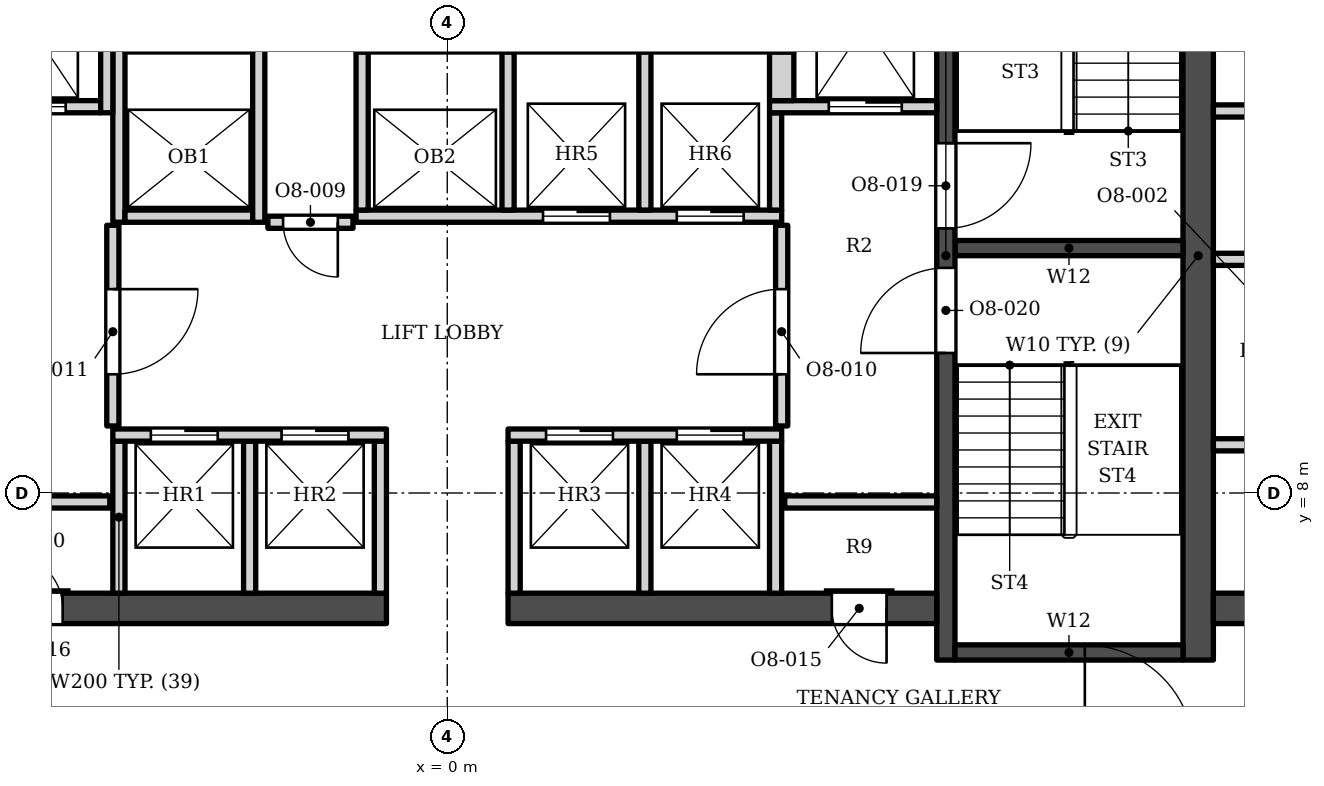
"""IFC4 building model, lengths in metres.
Left out: names, types, materials, properties, quantities, classifications, styles, units other than length and angle.
Written with IfcOpenShell. Run it as: python <this file> out.ifc"""

import sys

from ifc_helpers import new_model, si_unit, direction, frame, frame_2d, origin, place, context, subcontext, project, spatial, rectangle, extrude, element, fill, save


model = new_model("IFC4")
c1 = context("Model", 3, precision=1e-05, world=origin(), true_north=direction((0.0, 1.0)))
c2 = subcontext(c1, "Body", "Model", "MODEL_VIEW")
j1 = project(units=[si_unit("LENGTHUNIT", "METRE"), si_unit("PLANEANGLEUNIT", "RADIAN")], contexts=[c1])
p1 = place(None, origin())
s1 = spatial("IfcSite", under=j1, at=p1, CompositionType="ELEMENT")
p2 = place(p1, origin())
s2 = spatial("IfcBuilding", under=s1, at=p2, CompositionType="ELEMENT")
p3 = place(p2, frame((0.0, 0.0, 231.5)))
s3 = spatial("IfcBuildingStorey", under=s2, at=p3, CompositionType="ELEMENT", Elevation=231.5)
p4 = place(p3, frame((12.35, 5.253, 0.0), z_axis=(0.0, 0.0, 1.0), x_axis=(0.0, 1.0, 0.0)))
e1 = element("IfcWall", 1, at=p4, inside=s3, PredefinedType="SHEAR", context=c2, shape_type="SweptSolid", body=[
    extrude(rectangle(XDim=13.3, YDim=0.5, at=frame_2d((6.65, 0.0))), origin(), (0.0, 0.0, 1.0), 3.9),
])
p5 = place(p3, frame((8.2, 5.253, 0.0), z_axis=(0.0, 0.0, 1.0), x_axis=(0.0, 1.0, 0.0)))
e2 = element("IfcWall", 2, at=p5, inside=s3, PredefinedType="SHEAR", context=c2, shape_type="SweptSolid", body=[
    extrude(rectangle(XDim=13.3, YDim=0.3, at=frame_2d((6.65, 0.0))), origin(), (0.0, 0.0, 1.0), 3.9),
])
p6 = place(p5, frame((7.1, 0.0, 0.0)))
e3 = element("IfcOpeningElement", 3, at=p6, cuts=e2, PredefinedType="OPENING", context=c2, shape_type="SweptSolid", body=[
    extrude(rectangle(XDim=1.4, YDim=2.1, at=frame_2d((0.7, 1.05))), frame((0.0, 0.16, 0.0), z_axis=(0.0, -1.0, 0.0), x_axis=(1.0, 0.0, 0.0)), (0.0, 0.0, 1.0), 0.32),
])
p7 = place(p5, frame((5.05, 0.0, 0.0)))
e4 = element("IfcOpeningElement", 4, at=p7, cuts=e2, PredefinedType="OPENING", context=c2, shape_type="SweptSolid", body=[
    extrude(rectangle(XDim=1.4, YDim=2.1, at=frame_2d((0.7, 1.05))), frame((0.0, 0.16, 0.0), z_axis=(0.0, -1.0, 0.0), x_axis=(1.0, 0.0, 0.0)), (0.0, 0.0, 1.0), 0.32),
])
for number, where, z_axis, x_axis in (
    (5, (8.35, 12.028, 0.0), (0.0, 0.0, 1.0), (1.0, 0.0, 0.0)),
    (6, (8.35, 5.378, 0.0), (0.0, 0.0, 1.0), (1.0, 0.0, 0.0)),
):
    element("IfcWall", number, at=place(p3, frame(where, z_axis=z_axis, x_axis=x_axis)), inside=s3, PredefinedType="SHEAR", context=c2, shape_type="SweptSolid", body=[
        extrude(rectangle(XDim=3.75, YDim=0.25, at=frame_2d((1.875, 0.0))), origin(), (0.0, 0.0, 1.0), 3.9),
    ])
p8 = place(p3, frame((-8.05, 6.103, 0.0), z_axis=(0.0, 0.0, 1.0), x_axis=(1.0, 0.0, 0.0)))
e7 = element("IfcWall", 7, at=p8, inside=s3, PredefinedType="SHEAR", context=c2, shape_type="SweptSolid", body=[
    extrude(rectangle(XDim=7.05, YDim=0.5, at=frame_2d((3.525, 0.0))), origin(), (0.0, 0.0, 1.0), 3.9),
])
p9 = place(p8, frame((0.825, 0.0, 0.0)))
e8 = element("IfcOpeningElement", 8, at=p9, cuts=e7, PredefinedType="OPENING", context=c2, shape_type="SweptSolid", body=[
    extrude(rectangle(XDim=0.9, YDim=2.1, at=frame_2d((0.45, 1.05))), frame((0.0, 0.26, 0.0), z_axis=(0.0, -1.0, 0.0), x_axis=(1.0, 0.0, 0.0)), (0.0, 0.0, 1.0), 0.52),
])
p10 = place(p3, frame((1.0, 6.103, 0.0), z_axis=(0.0, 0.0, 1.0), x_axis=(1.0, 0.0, 0.0)))
e9 = element("IfcWall", 9, at=p10, inside=s3, PredefinedType="SHEAR", context=c2, shape_type="SweptSolid", body=[
    extrude(rectangle(XDim=7.05, YDim=0.5, at=frame_2d((3.525, 0.0))), origin(), (0.0, 0.0, 1.0), 3.9),
])
p11 = place(p10, frame((5.325, 0.0, 0.0)))
e10 = element("IfcOpeningElement", 10, at=p11, cuts=e9, PredefinedType="OPENING", context=c2, shape_type="SweptSolid", body=[
    extrude(rectangle(XDim=0.9, YDim=2.1, at=frame_2d((0.45, 1.05))), frame((0.0, 0.26, 0.0), z_axis=(0.0, -1.0, 0.0), x_axis=(1.0, 0.0, 0.0)), (0.0, 0.0, 1.0), 0.52),
])
p12 = place(p3, frame((12.6, 6.103, 0.0), z_axis=(0.0, 0.0, 1.0), x_axis=(1.0, 0.0, 0.0)))
e11 = element("IfcWall", 11, at=p12, inside=s3, PredefinedType="SHEAR", context=c2, shape_type="SweptSolid", body=[
    extrude(rectangle(XDim=1.3, YDim=0.5, at=frame_2d((0.65, 0.0))), origin(), (0.0, 0.0, 1.0), 3.9),
])
for number, where, z_axis, x_axis in (
    (12, (-5.4, 6.353, 0.0), (0.0, 0.0, 1.0), (0.0, 1.0, 0.0)),
    (13, (-3.25, 6.353, 0.0), (0.0, 0.0, 1.0), (0.0, 1.0, 0.0)),
    (14, (-1.1, 6.353, 0.0), (0.0, 0.0, 1.0), (0.0, 1.0, 0.0)),
    (15, (1.1, 6.353, 0.0), (0.0, 0.0, 1.0), (0.0, 1.0, 0.0)),
    (16, (3.25, 6.353, 0.0), (0.0, 0.0, 1.0), (0.0, 1.0, 0.0)),
    (17, (5.4, 6.353, 0.0), (0.0, 0.0, 1.0), (0.0, 1.0, 0.0)),
    (18, (-8.05, 7.853, 0.0), (0.0, 0.0, 1.0), (1.0, 0.0, 0.0)),
    (19, (5.55, 7.853, 0.0), (0.0, 0.0, 1.0), (1.0, 0.0, 0.0)),
):
    element("IfcWall", number, at=place(p3, frame(where, z_axis=z_axis, x_axis=x_axis)), inside=s3, PredefinedType="SOLIDWALL", context=c2, shape_type="SweptSolid", body=[
        extrude(rectangle(XDim=2.5, YDim=0.2, at=frame_2d((1.25, 0.0))), origin(), (0.0, 0.0, 1.0), 3.73),
    ])
p13 = place(p3, frame((12.6, 8.792, 0.0), z_axis=(0.0, 0.0, 1.0), x_axis=(1.0, 0.0, 0.0)))
e20 = element("IfcWall", 20, at=p13, inside=s3, PredefinedType="SOLIDWALL", context=c2, shape_type="SweptSolid", body=[
    extrude(rectangle(XDim=1.3, YDim=0.2, at=frame_2d((0.65, 0.0))), origin(), (0.0, 0.0, 1.0), 3.73),
])
p14 = place(p3, frame((-5.5, 8.953, 0.0), z_axis=(0.0, 0.0, 1.0), x_axis=(1.0, 0.0, 0.0)))
e21 = element("IfcWall", 21, at=p14, inside=s3, PredefinedType="SOLIDWALL", context=c2, shape_type="SweptSolid", body=[
    extrude(rectangle(XDim=4.5, YDim=0.2, at=frame_2d((2.25, 0.0))), origin(), (0.0, 0.0, 1.0), 3.73),
])
p15 = place(p14, frame((0.625, 0.0, 0.0)))
e22 = element("IfcOpeningElement", 22, at=p15, cuts=e21, PredefinedType="OPENING", context=c2, shape_type="SweptSolid", body=[
    extrude(rectangle(XDim=1.1, YDim=2.1, at=frame_2d((0.55, 1.05))), frame((0.0, 0.11, 0.0), z_axis=(0.0, -1.0, 0.0), x_axis=(1.0, 0.0, 0.0)), (0.0, 0.0, 1.0), 0.22),
])
p16 = place(p14, frame((2.775, 0.0, 0.0)))
e23 = element("IfcOpeningElement", 23, at=p16, cuts=e21, PredefinedType="OPENING", context=c2, shape_type="SweptSolid", body=[
    extrude(rectangle(XDim=1.1, YDim=2.1, at=frame_2d((0.55, 1.05))), frame((0.0, 0.11, 0.0), z_axis=(0.0, -1.0, 0.0), x_axis=(1.0, 0.0, 0.0)), (0.0, 0.0, 1.0), 0.22),
])
p17 = place(p3, frame((1.0, 8.953, 0.0), z_axis=(0.0, 0.0, 1.0), x_axis=(1.0, 0.0, 0.0)))
e24 = element("IfcWall", 24, at=p17, inside=s3, PredefinedType="SOLIDWALL", context=c2, shape_type="SweptSolid", body=[
    extrude(rectangle(XDim=4.5, YDim=0.2, at=frame_2d((2.25, 0.0))), origin(), (0.0, 0.0, 1.0), 3.73),
])
p18 = place(p17, frame((0.625, 0.0, 0.0)))
e25 = element("IfcOpeningElement", 25, at=p18, cuts=e24, PredefinedType="OPENING", context=c2, shape_type="SweptSolid", body=[
    extrude(rectangle(XDim=1.1, YDim=2.1, at=frame_2d((0.55, 1.05))), frame((0.0, 0.11, 0.0), z_axis=(0.0, -1.0, 0.0), x_axis=(1.0, 0.0, 0.0)), (0.0, 0.0, 1.0), 0.22),
])
p19 = place(p17, frame((2.775, 0.0, 0.0)))
e26 = element("IfcOpeningElement", 26, at=p19, cuts=e24, PredefinedType="OPENING", context=c2, shape_type="SweptSolid", body=[
    extrude(rectangle(XDim=1.1, YDim=2.1, at=frame_2d((0.55, 1.05))), frame((0.0, 0.11, 0.0), z_axis=(0.0, -1.0, 0.0), x_axis=(1.0, 0.0, 0.0)), (0.0, 0.0, 1.0), 0.22),
])
p20 = place(p3, frame((-5.5, 9.103, 0.0), z_axis=(0.0, 0.0, 1.0), x_axis=(0.0, 1.0, 0.0)))
e27 = element("IfcWall", 27, at=p20, inside=s3, PredefinedType="SOLIDWALL", context=c2, shape_type="SweptSolid", body=[
    extrude(rectangle(XDim=3.3, YDim=0.2, at=frame_2d((1.65, 0.0))), origin(), (0.0, 0.0, 1.0), 3.73),
])
p21 = place(p20, frame((0.85, 0.0, 0.0)))
e28 = element("IfcOpeningElement", 28, at=p21, cuts=e27, PredefinedType="OPENING", context=c2, shape_type="SweptSolid", body=[
    extrude(rectangle(XDim=1.4, YDim=2.1, at=frame_2d((0.7, 1.05))), frame((0.0, 0.11, 0.0), z_axis=(0.0, -1.0, 0.0), x_axis=(1.0, 0.0, 0.0)), (0.0, 0.0, 1.0), 0.22),
])
p22 = place(p3, frame((5.5, 9.103, 0.0), z_axis=(0.0, 0.0, 1.0), x_axis=(0.0, 1.0, 0.0)))
e29 = element("IfcWall", 29, at=p22, inside=s3, PredefinedType="SOLIDWALL", context=c2, shape_type="SweptSolid", body=[
    extrude(rectangle(XDim=3.3, YDim=0.2, at=frame_2d((1.65, 0.0))), origin(), (0.0, 0.0, 1.0), 3.73),
])
p23 = place(p22, frame((0.85, 0.0, 0.0)))
e30 = element("IfcOpeningElement", 30, at=p23, cuts=e29, PredefinedType="OPENING", context=c2, shape_type="SweptSolid", body=[
    extrude(rectangle(XDim=1.4, YDim=2.1, at=frame_2d((0.7, 1.05))), frame((0.0, 0.11, 0.0), z_axis=(0.0, -1.0, 0.0), x_axis=(1.0, 0.0, 0.0)), (0.0, 0.0, 1.0), 0.22),
])
p24 = place(p3, frame((12.6, 11.843, 0.0), z_axis=(0.0, 0.0, 1.0), x_axis=(1.0, 0.0, 0.0)))
e31 = element("IfcWall", 31, at=p24, inside=s3, PredefinedType="SOLIDWALL", context=c2, shape_type="SweptSolid", body=[
    extrude(rectangle(XDim=1.3, YDim=0.2, at=frame_2d((0.65, 0.0))), origin(), (0.0, 0.0, 1.0), 3.73),
])
p25 = place(p3, frame((-2.95, 12.453, 0.0), z_axis=(0.0, 0.0, 1.0), x_axis=(1.0, 0.0, 0.0)))
e32 = element("IfcWall", 32, at=p25, inside=s3, PredefinedType="SOLIDWALL", context=c2, shape_type="SweptSolid", body=[
    extrude(rectangle(XDim=1.4, YDim=0.2, at=frame_2d((0.7, 0.0))), origin(), (0.0, 0.0, 1.0), 3.73),
])
p26 = place(p25, frame((0.25, 0.0, 0.0)))
e33 = element("IfcOpeningElement", 33, at=p26, cuts=e32, PredefinedType="OPENING", context=c2, shape_type="SweptSolid", body=[
    extrude(rectangle(XDim=0.9, YDim=2.1, at=frame_2d((0.45, 1.05))), frame((0.0, 0.11, 0.0), z_axis=(0.0, -1.0, 0.0), x_axis=(1.0, 0.0, 0.0)), (0.0, 0.0, 1.0), 0.22),
])
p27 = place(p3, frame((-5.4, 12.453, 0.0), z_axis=(0.0, 0.0, 1.0), x_axis=(0.0, 1.0, 0.0)))
e34 = element("IfcWall", 34, at=p27, inside=s3, PredefinedType="SOLIDWALL", context=c2, shape_type="SweptSolid", body=[
    extrude(rectangle(XDim=3.0, YDim=0.2, at=frame_2d((1.5, 0.0))), origin(), (0.0, 0.0, 1.0), 3.73),
])
p28 = place(p3, frame((-5.3, 12.552, 0.0), z_axis=(0.0, 0.0, 1.0), x_axis=(1.0, 0.0, 0.0)))
e35 = element("IfcWall", 35, at=p28, inside=s3, PredefinedType="SOLIDWALL", context=c2, shape_type="SweptSolid", body=[
    extrude(rectangle(XDim=2.1, YDim=0.2, at=frame_2d((1.05, 0.0))), origin(), (0.0, 0.0, 1.0), 3.73),
])
p29 = place(p3, frame((-3.1, 12.453, 0.0), z_axis=(0.0, 0.0, 1.0), x_axis=(0.0, 1.0, 0.0)))
e36 = element("IfcWall", 36, at=p29, inside=s3, PredefinedType="SOLIDWALL", context=c2, shape_type="SweptSolid", body=[
    extrude(rectangle(XDim=3.0, YDim=0.2, at=frame_2d((1.5, 0.0))), origin(), (0.0, 0.0, 1.0), 3.73),
])
p30 = place(p3, frame((-1.5, 12.552, 0.0), z_axis=(0.0, 0.0, 1.0), x_axis=(1.0, 0.0, 0.0)))
e37 = element("IfcWall", 37, at=p30, inside=s3, PredefinedType="SOLIDWALL", context=c2, shape_type="SweptSolid", body=[
    extrude(rectangle(XDim=7.0, YDim=0.2, at=frame_2d((3.5, 0.0))), origin(), (0.0, 0.0, 1.0), 3.73),
])
p31 = place(p30, frame((3.075, 0.0, 0.0)))
e38 = element("IfcOpeningElement", 38, at=p31, cuts=e37, PredefinedType="OPENING", context=c2, shape_type="SweptSolid", body=[
    extrude(rectangle(XDim=1.1, YDim=2.1, at=frame_2d((0.55, 1.05))), frame((0.0, 0.11, 0.0), z_axis=(0.0, -1.0, 0.0), x_axis=(1.0, 0.0, 0.0)), (0.0, 0.0, 1.0), 0.22),
])
p32 = place(p30, frame((5.275, 0.0, 0.0)))
e39 = element("IfcOpeningElement", 39, at=p32, cuts=e37, PredefinedType="OPENING", context=c2, shape_type="SweptSolid", body=[
    extrude(rectangle(XDim=1.1, YDim=2.1, at=frame_2d((0.55, 1.05))), frame((0.0, 0.11, 0.0), z_axis=(0.0, -1.0, 0.0), x_axis=(1.0, 0.0, 0.0)), (0.0, 0.0, 1.0), 0.22),
])
for number, where, z_axis, x_axis in (
    (40, (-1.4, 12.653, 0.0), (0.0, 0.0, 1.0), (0.0, 1.0, 0.0)),
    (41, (1.0, 12.653, 0.0), (0.0, 0.0, 1.0), (0.0, 1.0, 0.0)),
    (42, (3.25, 12.653, 0.0), (0.0, 0.0, 1.0), (0.0, 1.0, 0.0)),
):
    element("IfcWall", number, at=place(p3, frame(where, z_axis=z_axis, x_axis=x_axis)), inside=s3, PredefinedType="SOLIDWALL", context=c2, shape_type="SweptSolid", body=[
        extrude(rectangle(XDim=2.6, YDim=0.2, at=frame_2d((1.3, 0.0))), origin(), (0.0, 0.0, 1.0), 3.73),
    ])
p33 = place(p3, frame((5.4, 12.653, 0.0), z_axis=(0.0, 0.0, 1.0), x_axis=(0.0, 1.0, 0.0)))
e43 = element("IfcWall", 43, at=p33, inside=s3, PredefinedType="SOLIDWALL", context=c2, shape_type="SweptSolid", body=[
    extrude(rectangle(XDim=1.6, YDim=0.2, at=frame_2d((0.8, 0.0))), origin(), (0.0, 0.0, 1.0), 3.73),
])
p34 = place(p3, frame((12.6, 14.283, 0.0), z_axis=(0.0, 0.0, 1.0), x_axis=(1.0, 0.0, 0.0)))
e44 = element("IfcWall", 44, at=p34, inside=s3, PredefinedType="SOLIDWALL", context=c2, shape_type="SweptSolid", body=[
    extrude(rectangle(XDim=1.3, YDim=0.2, at=frame_2d((0.65, 0.0))), origin(), (0.0, 0.0, 1.0), 3.73),
])
p35 = place(p3, frame((-8.05, 14.353, 0.0), z_axis=(0.0, 0.0, 1.0), x_axis=(1.0, 0.0, 0.0)))
e45 = element("IfcWall", 45, at=p35, inside=s3, PredefinedType="SOLIDWALL", context=c2, shape_type="SweptSolid", body=[
    extrude(rectangle(XDim=2.35, YDim=0.2, at=frame_2d((1.175, 0.0))), origin(), (0.0, 0.0, 1.0), 3.73),
])
p36 = place(p35, frame((0.575, 0.0, 0.0)))
e46 = element("IfcOpeningElement", 46, at=p36, cuts=e45, PredefinedType="OPENING", context=c2, shape_type="SweptSolid", body=[
    extrude(rectangle(XDim=1.2, YDim=2.1, at=frame_2d((0.6, 1.05))), frame((0.0, 0.11, 0.0), z_axis=(0.0, -1.0, 0.0), x_axis=(1.0, 0.0, 0.0)), (0.0, 0.0, 1.0), 0.22),
])
p37 = place(p3, frame((-5.6, 14.253, 0.0), z_axis=(0.0, 0.0, 1.0), x_axis=(0.0, 1.0, 0.0)))
e47 = element("IfcWall", 47, at=p37, inside=s3, PredefinedType="SOLIDWALL", context=c2, shape_type="SweptSolid", body=[
    extrude(rectangle(XDim=4.3, YDim=0.2, at=frame_2d((2.15, 0.0))), origin(), (0.0, 0.0, 1.0), 3.73),
])
p38 = place(p3, frame((5.3, 14.353, 0.0), z_axis=(0.0, 0.0, 1.0), x_axis=(1.0, 0.0, 0.0)))
e48 = element("IfcWall", 48, at=p38, inside=s3, PredefinedType="SOLIDWALL", context=c2, shape_type="SweptSolid", body=[
    extrude(rectangle(XDim=2.75, YDim=0.2, at=frame_2d((1.375, 0.0))), origin(), (0.0, 0.0, 1.0), 3.73),
])
p39 = place(p38, frame((0.975, 0.0, 0.0)))
e49 = element("IfcOpeningElement", 49, at=p39, cuts=e48, PredefinedType="OPENING", context=c2, shape_type="SweptSolid", body=[
    extrude(rectangle(XDim=1.2, YDim=2.1, at=frame_2d((0.6, 1.05))), frame((0.0, 0.11, 0.0), z_axis=(0.0, -1.0, 0.0), x_axis=(1.0, 0.0, 0.0)), (0.0, 0.0, 1.0), 0.22),
])
p40 = place(p3, frame((5.5, 14.453, 0.0), z_axis=(0.0, 0.0, 1.0), x_axis=(0.0, 1.0, 0.0)))
e50 = element("IfcWall", 50, at=p40, inside=s3, PredefinedType="SOLIDWALL", context=c2, shape_type="SweptSolid", body=[
    extrude(rectangle(XDim=0.8, YDim=0.4, at=frame_2d((0.4, 0.0))), origin(), (0.0, 0.0, 1.0), 3.73),
])
p41 = place(p3, frame((-5.3, 15.353, 0.0), z_axis=(0.0, 0.0, 1.0), x_axis=(1.0, 0.0, 0.0)))
e51 = element("IfcWall", 51, at=p41, inside=s3, PredefinedType="SOLIDWALL", context=c2, shape_type="SweptSolid", body=[
    extrude(rectangle(XDim=2.1, YDim=0.2, at=frame_2d((1.05, 0.0))), origin(), (0.0, 0.0, 1.0), 3.73),
])
p42 = place(p3, frame((-1.5, 15.353, 0.0), z_axis=(0.0, 0.0, 1.0), x_axis=(1.0, 0.0, 0.0)))
e52 = element("IfcWall", 52, at=p42, inside=s3, PredefinedType="SOLIDWALL", context=c2, shape_type="SweptSolid", body=[
    extrude(rectangle(XDim=7.2, YDim=0.2, at=frame_2d((3.6, 0.0))), origin(), (0.0, 0.0, 1.0), 3.73),
])
p43 = place(p15, origin())
e53 = element("IfcDoor", 53, at=p43, inside=s3, OperationType="DOUBLE_DOOR_SLIDING", PredefinedType="DOOR", context=c2, shape_type="SweptSolid", body=[
    extrude(rectangle(XDim=1.1, YDim=2.1, at=frame_2d((0.55, 1.05))), frame((0.0, 0.025, 0.0), z_axis=(0.0, -1.0, 0.0), x_axis=(1.0, 0.0, 0.0)), (0.0, 0.0, 1.0), 0.05),
])
fill(e22, e53)
p44 = place(p16, origin())
e54 = element("IfcDoor", 54, at=p44, inside=s3, OperationType="DOUBLE_DOOR_SLIDING", PredefinedType="DOOR", context=c2, shape_type="SweptSolid", body=[
    extrude(rectangle(XDim=1.1, YDim=2.1, at=frame_2d((0.55, 1.05))), frame((0.0, 0.025, 0.0), z_axis=(0.0, -1.0, 0.0), x_axis=(1.0, 0.0, 0.0)), (0.0, 0.0, 1.0), 0.05),
])
fill(e23, e54)
p45 = place(p18, origin())
e55 = element("IfcDoor", 55, at=p45, inside=s3, OperationType="DOUBLE_DOOR_SLIDING", PredefinedType="DOOR", context=c2, shape_type="SweptSolid", body=[
    extrude(rectangle(XDim=1.1, YDim=2.1, at=frame_2d((0.55, 1.05))), frame((0.0, 0.025, 0.0), z_axis=(0.0, -1.0, 0.0), x_axis=(1.0, 0.0, 0.0)), (0.0, 0.0, 1.0), 0.05),
])
fill(e25, e55)
p46 = place(p19, origin())
e56 = element("IfcDoor", 56, at=p46, inside=s3, OperationType="DOUBLE_DOOR_SLIDING", PredefinedType="DOOR", context=c2, shape_type="SweptSolid", body=[
    extrude(rectangle(XDim=1.1, YDim=2.1, at=frame_2d((0.55, 1.05))), frame((0.0, 0.025, 0.0), z_axis=(0.0, -1.0, 0.0), x_axis=(1.0, 0.0, 0.0)), (0.0, 0.0, 1.0), 0.05),
])
fill(e26, e56)
p47 = place(p31, origin())
e57 = element("IfcDoor", 57, at=p47, inside=s3, OperationType="DOUBLE_DOOR_SLIDING", PredefinedType="DOOR", context=c2, shape_type="SweptSolid", body=[
    extrude(rectangle(XDim=1.1, YDim=2.1, at=frame_2d((0.55, 1.05))), frame((0.0, 0.025, 0.0), z_axis=(0.0, -1.0, 0.0), x_axis=(1.0, 0.0, 0.0)), (0.0, 0.0, 1.0), 0.05),
])
fill(e38, e57)
p48 = place(p32, origin())
e58 = element("IfcDoor", 58, at=p48, inside=s3, OperationType="DOUBLE_DOOR_SLIDING", PredefinedType="DOOR", context=c2, shape_type="SweptSolid", body=[
    extrude(rectangle(XDim=1.1, YDim=2.1, at=frame_2d((0.55, 1.05))), frame((0.0, 0.025, 0.0), z_axis=(0.0, -1.0, 0.0), x_axis=(1.0, 0.0, 0.0)), (0.0, 0.0, 1.0), 0.05),
])
fill(e39, e58)
p49 = place(p36, origin())
e59 = element("IfcDoor", 59, at=p49, inside=s3, OperationType="DOUBLE_DOOR_SLIDING", PredefinedType="DOOR", context=c2, shape_type="SweptSolid", body=[
    extrude(rectangle(XDim=1.2, YDim=2.1, at=frame_2d((0.6, 1.05))), frame((0.0, 0.025, 0.0), z_axis=(0.0, -1.0, 0.0), x_axis=(1.0, 0.0, 0.0)), (0.0, 0.0, 1.0), 0.05),
])
fill(e46, e59)
p50 = place(p39, origin())
e60 = element("IfcDoor", 60, at=p50, inside=s3, OperationType="DOUBLE_DOOR_SLIDING", PredefinedType="DOOR", context=c2, shape_type="SweptSolid", body=[
    extrude(rectangle(XDim=1.2, YDim=2.1, at=frame_2d((0.6, 1.05))), frame((0.0, 0.025, 0.0), z_axis=(0.0, -1.0, 0.0), x_axis=(1.0, 0.0, 0.0)), (0.0, 0.0, 1.0), 0.05),
])
fill(e49, e60)
p51 = place(p6, origin())
e61 = element("IfcDoor", 61, at=p51, inside=s3, OperationType="SINGLE_SWING_RIGHT", PredefinedType="DOOR", context=c2, shape_type="SweptSolid", body=[
    extrude(rectangle(XDim=1.4, YDim=2.1, at=frame_2d((0.7, 1.05))), frame((0.0, 0.025, 0.0), z_axis=(0.0, -1.0, 0.0), x_axis=(1.0, 0.0, 0.0)), (0.0, 0.0, 1.0), 0.05),
])
fill(e3, e61)
p52 = place(p7, origin())
e62 = element("IfcDoor", 62, at=p52, inside=s3, OperationType="SINGLE_SWING_LEFT", PredefinedType="DOOR", context=c2, shape_type="SweptSolid", body=[
    extrude(rectangle(XDim=1.4, YDim=2.1, at=frame_2d((0.7, 1.05))), frame((0.0, 0.025, 0.0), z_axis=(0.0, -1.0, 0.0), x_axis=(1.0, 0.0, 0.0)), (0.0, 0.0, 1.0), 0.05),
])
fill(e4, e62)
p53 = place(p26, origin())
e63 = element("IfcDoor", 63, at=p53, inside=s3, OperationType="SINGLE_SWING_RIGHT", PredefinedType="DOOR", context=c2, shape_type="SweptSolid", body=[
    extrude(rectangle(XDim=0.9, YDim=2.1, at=frame_2d((0.45, 1.05))), frame((0.0, 0.025, 0.0), z_axis=(0.0, -1.0, 0.0), x_axis=(1.0, 0.0, 0.0)), (0.0, 0.0, 1.0), 0.05),
])
fill(e33, e63)
p54 = place(p21, origin())
e64 = element("IfcDoor", 64, at=p54, inside=s3, OperationType="SINGLE_SWING_RIGHT", PredefinedType="DOOR", context=c2, shape_type="SweptSolid", body=[
    extrude(rectangle(XDim=1.4, YDim=2.1, at=frame_2d((0.7, 1.05))), frame((0.0, 0.025, 0.0), z_axis=(0.0, -1.0, 0.0), x_axis=(1.0, 0.0, 0.0)), (0.0, 0.0, 1.0), 0.05),
])
fill(e28, e64)
p55 = place(p23, origin())
e65 = element("IfcDoor", 65, at=p55, inside=s3, OperationType="SINGLE_SWING_LEFT", PredefinedType="DOOR", context=c2, shape_type="SweptSolid", body=[
    extrude(rectangle(XDim=1.4, YDim=2.1, at=frame_2d((0.7, 1.05))), frame((0.0, 0.025, 0.0), z_axis=(0.0, -1.0, 0.0), x_axis=(1.0, 0.0, 0.0)), (0.0, 0.0, 1.0), 0.05),
])
fill(e30, e65)
p56 = place(p9, origin())
e66 = element("IfcDoor", 66, at=p56, inside=s3, OperationType="SINGLE_SWING_LEFT", PredefinedType="DOOR", context=c2, shape_type="SweptSolid", body=[
    extrude(rectangle(XDim=0.9, YDim=2.1, at=frame_2d((0.45, 1.05))), frame((0.0, 0.025, 0.0), z_axis=(0.0, -1.0, 0.0), x_axis=(1.0, 0.0, 0.0)), (0.0, 0.0, 1.0), 0.05),
])
fill(e8, e66)
p57 = place(p11, origin())
e67 = element("IfcDoor", 67, at=p57, inside=s3, OperationType="SINGLE_SWING_RIGHT", PredefinedType="DOOR", context=c2, shape_type="SweptSolid", body=[
    extrude(rectangle(XDim=0.9, YDim=2.1, at=frame_2d((0.45, 1.05))), frame((0.0, 0.025, 0.0), z_axis=(0.0, -1.0, 0.0), x_axis=(1.0, 0.0, 0.0)), (0.0, 0.0, 1.0), 0.05),
])
fill(e10, e67)
save(model, sys.argv[1])
